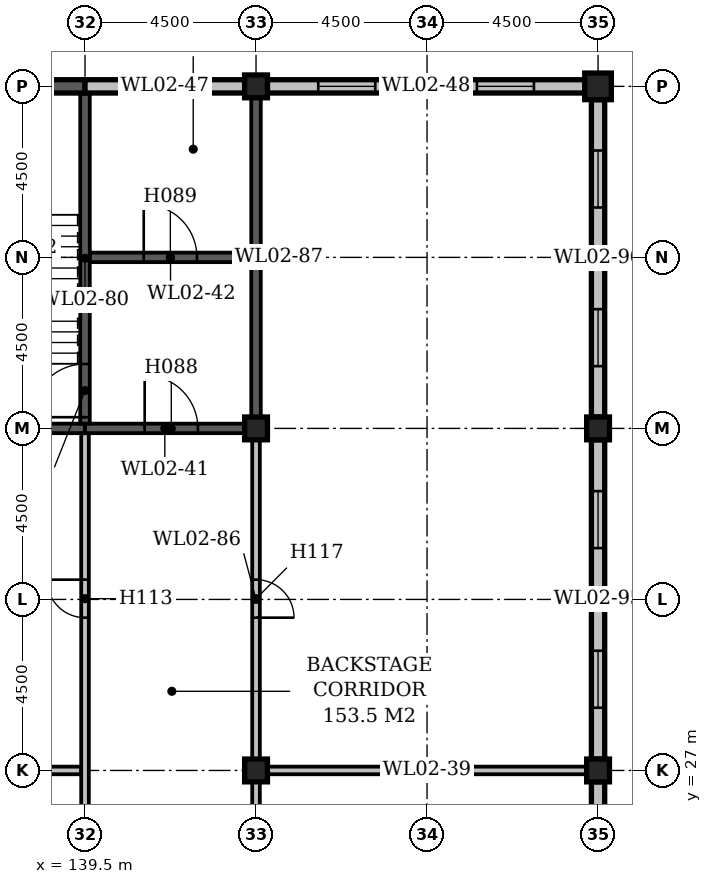
"""IFC4 building model, lengths in metres.
Left out: names, types, materials, properties, quantities, classifications, styles, units other than length and angle.
Written with IfcOpenShell. Run it as: python <this file> out.ifc"""

import sys

from ifc_helpers import new_model, si_unit, direction, frame, frame_2d, origin, origin_2d, place, context, subcontext, project, spatial, rectangle, extrude, element, fill, save


model = new_model("IFC4")
c1 = context("Model", 3, precision=1e-05, world=origin(), true_north=direction((0.0, 1.0)))
c2 = subcontext(c1, "Body", "Model", "MODEL_VIEW")
j1 = project(units=[si_unit("LENGTHUNIT", "METRE"), si_unit("PLANEANGLEUNIT", "RADIAN")], contexts=[c1])
p1 = place(None, origin())
s1 = spatial("IfcSite", under=j1, at=p1, CompositionType="ELEMENT")
p2 = place(p1, origin())
s2 = spatial("IfcBuilding", under=s1, at=p2, CompositionType="ELEMENT")
p3 = place(p2, frame((0.0, 0.0, 14.0)))
s3 = spatial("IfcBuildingStorey", under=s2, at=p3, CompositionType="ELEMENT", Elevation=14.0)
for number, where, z_axis, x_axis in (
    (1, (144.0, 27.0, 0.0), (0.0, 0.0, 1.0), (1.0, 0.0, 0.0)),
    (2, (144.0, 36.0, 0.0), (0.0, 0.0, 1.0), (1.0, 0.0, 0.0)),
    (3, (144.0, 45.0, 0.0), (0.0, 0.0, 1.0), (1.0, 0.0, 0.0)),
    (4, (153.0, 27.0, 0.0), (0.0, 0.0, 1.0), (1.0, 0.0, 0.0)),
    (5, (153.0, 36.0, 0.0), (0.0, 0.0, 1.0), (1.0, 0.0, 0.0)),
):
    element("IfcColumn", number, at=place(p3, frame(where, z_axis=z_axis, x_axis=x_axis)), inside=s3, PredefinedType="COLUMN", context=c2, shape_type="SweptSolid", body=[
        extrude(rectangle(XDim=0.6, YDim=0.6, at=origin_2d()), origin(), (0.0, 0.0, 1.0), 4.7),
    ])
p4 = place(p3, frame((153.0, 45.0, 0.0), z_axis=(0.0, 0.0, 1.0), x_axis=(1.0, 0.0, 0.0)))
e6 = element("IfcColumn", 6, at=p4, inside=s3, PredefinedType="COLUMN", context=c2, shape_type="SweptSolid", body=[
    extrude(rectangle(XDim=0.7, YDim=0.7, at=origin_2d()), origin(), (0.0, 0.0, 1.0), 4.7),
])
p5 = place(p3, frame((135.4, 27.0, 0.0), z_axis=(0.0, 0.0, 1.0), x_axis=(1.0, 0.0, 0.0)))
e7 = element("IfcWall", 7, at=p5, inside=s3, PredefinedType="STANDARD", context=c2, shape_type="SweptSolid", body=[
    extrude(rectangle(XDim=4.0, YDim=0.2, at=frame_2d((2.0, 0.0))), origin(), (0.0, 0.0, 1.0), 4.7),
])
p6 = place(p3, frame((144.3, 27.0, 0.0), z_axis=(0.0, 0.0, 1.0), x_axis=(1.0, 0.0, 0.0)))
e8 = element("IfcWall", 8, at=p6, inside=s3, PredefinedType="STANDARD", context=c2, shape_type="SweptSolid", body=[
    extrude(rectangle(XDim=8.4, YDim=0.2, at=frame_2d((4.2, 0.0))), origin(), (0.0, 0.0, 1.0), 4.7),
])
p7 = place(p3, frame((135.3, 36.0, 0.0), z_axis=(0.0, 0.0, 1.0), x_axis=(1.0, 0.0, 0.0)))
e9 = element("IfcWall", 9, at=p7, inside=s3, PredefinedType="STANDARD", context=c2, shape_type="SweptSolid", body=[
    extrude(rectangle(XDim=4.2, YDim=0.25, at=frame_2d((2.1, 0.0))), origin(), (0.0, 0.0, 1.0), 5.0),
])
p8 = place(p3, frame((139.5, 36.0, 0.0), z_axis=(0.0, 0.0, 1.0), x_axis=(1.0, 0.0, 0.0)))
e10 = element("IfcWall", 10, at=p8, inside=s3, PredefinedType="STANDARD", context=c2, shape_type="SweptSolid", body=[
    extrude(rectangle(XDim=4.2, YDim=0.25, at=frame_2d((2.1, 0.0))), origin(), (0.0, 0.0, 1.0), 4.7),
])
p9 = place(p8, frame((1.57, 0.0, 0.0)))
e11 = element("IfcOpeningElement", 11, at=p9, cuts=e10, PredefinedType="OPENING", context=c2, shape_type="SweptSolid", body=[
    extrude(rectangle(XDim=1.4, YDim=2.1, at=frame_2d((0.7, 1.05))), frame((0.0, 0.137, 0.0), z_axis=(0.0, -1.0, 0.0), x_axis=(1.0, 0.0, 0.0)), (0.0, 0.0, 1.0), 0.274),
])
p10 = place(p3, frame((139.625, 40.5, 0.0), z_axis=(0.0, 0.0, 1.0), x_axis=(1.0, 0.0, 0.0)))
e12 = element("IfcWall", 12, at=p10, inside=s3, PredefinedType="STANDARD", context=c2, shape_type="SweptSolid", body=[
    extrude(rectangle(XDim=4.25, YDim=0.25, at=frame_2d((2.125, 0.0))), origin(), (0.0, 0.0, 1.0), 4.7),
])
p11 = place(p10, frame((1.42, 0.0, 0.0)))
e13 = element("IfcOpeningElement", 13, at=p11, cuts=e12, PredefinedType="OPENING", context=c2, shape_type="SweptSolid", body=[
    extrude(rectangle(XDim=1.4, YDim=2.1, at=frame_2d((0.7, 1.05))), frame((0.0, 0.137, 0.0), z_axis=(0.0, -1.0, 0.0), x_axis=(1.0, 0.0, 0.0)), (0.0, 0.0, 1.0), 0.274),
])
p12 = place(p3, frame((135.4, 45.0, 0.0), z_axis=(0.0, 0.0, 1.0), x_axis=(1.0, 0.0, 0.0)))
e14 = element("IfcWall", 14, at=p12, inside=s3, PredefinedType="STANDARD", context=c2, shape_type="SweptSolid", body=[
    extrude(rectangle(XDim=4.1, YDim=0.35, at=frame_2d((2.05, 0.0))), origin(), (0.0, 0.0, 1.0), 5.0),
])
p13 = place(p3, frame((139.5, 45.0, 0.0), z_axis=(0.0, 0.0, 1.0), x_axis=(1.0, 0.0, 0.0)))
e15 = element("IfcWall", 15, at=p13, inside=s3, PredefinedType="STANDARD", context=c2, shape_type="SweptSolid", body=[
    extrude(rectangle(XDim=4.2, YDim=0.35, at=frame_2d((2.1, 0.0))), origin(), (0.0, 0.0, 1.0), 4.1),
])
p14 = place(p3, frame((144.3, 45.0, 0.0), z_axis=(0.0, 0.0, 1.0), x_axis=(1.0, 0.0, 0.0)))
e16 = element("IfcWall", 16, at=p14, inside=s3, PredefinedType="STANDARD", context=c2, shape_type="SweptSolid", body=[
    extrude(rectangle(XDim=8.35, YDim=0.35, at=frame_2d((4.175, 0.0))), origin(), (0.0, 0.0, 1.0), 4.1),
])
p15 = place(p14, frame((1.337, 0.0, 1.0)))
e17 = element("IfcOpeningElement", 17, at=p15, cuts=e16, PredefinedType="OPENING", context=c2, shape_type="SweptSolid", body=[
    extrude(rectangle(XDim=1.5, YDim=2.4, at=frame_2d((0.75, 1.2))), frame((0.0, 0.187, 0.0), z_axis=(0.0, -1.0, 0.0), x_axis=(1.0, 0.0, 0.0)), (0.0, 0.0, 1.0), 0.374),
])
p16 = place(p14, frame((5.512, 0.0, 1.0)))
e18 = element("IfcOpeningElement", 18, at=p16, cuts=e16, PredefinedType="OPENING", context=c2, shape_type="SweptSolid", body=[
    extrude(rectangle(XDim=1.5, YDim=2.4, at=frame_2d((0.75, 1.2))), frame((0.0, 0.187, 0.0), z_axis=(0.0, -1.0, 0.0), x_axis=(1.0, 0.0, 0.0)), (0.0, 0.0, 1.0), 0.374),
])
p17 = place(p3, frame((139.5, 0.1, 0.0), z_axis=(0.0, 0.0, 1.0), x_axis=(0.0, 1.0, 0.0)))
e19 = element("IfcWall", 19, at=p17, inside=s3, PredefinedType="STANDARD", context=c2, shape_type="SweptSolid", body=[
    extrude(rectangle(XDim=35.775, YDim=0.2, at=frame_2d((17.887, 0.0))), origin(), (0.0, 0.0, 1.0), 4.7),
])
p18 = place(p17, frame((6.17, 0.0, 0.0)))
e20 = element("IfcOpeningElement", 20, at=p18, cuts=e19, PredefinedType="OPENING", context=c2, shape_type="SweptSolid", body=[
    extrude(rectangle(XDim=1.0, YDim=2.1, at=frame_2d((0.5, 1.05))), frame((0.0, 0.112, 0.0), z_axis=(0.0, -1.0, 0.0), x_axis=(1.0, 0.0, 0.0)), (0.0, 0.0, 1.0), 0.224),
])
p19 = place(p17, frame((10.67, 0.0, 0.0)))
e21 = element("IfcOpeningElement", 21, at=p19, cuts=e19, PredefinedType="OPENING", context=c2, shape_type="SweptSolid", body=[
    extrude(rectangle(XDim=1.0, YDim=2.1, at=frame_2d((0.5, 1.05))), frame((0.0, 0.112, 0.0), z_axis=(0.0, -1.0, 0.0), x_axis=(1.0, 0.0, 0.0)), (0.0, 0.0, 1.0), 0.224),
])
p20 = place(p17, frame((15.17, 0.0, 0.0)))
e22 = element("IfcOpeningElement", 22, at=p20, cuts=e19, PredefinedType="OPENING", context=c2, shape_type="SweptSolid", body=[
    extrude(rectangle(XDim=1.0, YDim=2.1, at=frame_2d((0.5, 1.05))), frame((0.0, 0.112, 0.0), z_axis=(0.0, -1.0, 0.0), x_axis=(1.0, 0.0, 0.0)), (0.0, 0.0, 1.0), 0.224),
])
p21 = place(p17, frame((19.67, 0.0, 0.0)))
e23 = element("IfcOpeningElement", 23, at=p21, cuts=e19, PredefinedType="OPENING", context=c2, shape_type="SweptSolid", body=[
    extrude(rectangle(XDim=1.0, YDim=2.1, at=frame_2d((0.5, 1.05))), frame((0.0, 0.112, 0.0), z_axis=(0.0, -1.0, 0.0), x_axis=(1.0, 0.0, 0.0)), (0.0, 0.0, 1.0), 0.224),
])
p22 = place(p17, frame((24.17, 0.0, 0.0)))
e24 = element("IfcOpeningElement", 24, at=p22, cuts=e19, PredefinedType="OPENING", context=c2, shape_type="SweptSolid", body=[
    extrude(rectangle(XDim=1.0, YDim=2.1, at=frame_2d((0.5, 1.05))), frame((0.0, 0.112, 0.0), z_axis=(0.0, -1.0, 0.0), x_axis=(1.0, 0.0, 0.0)), (0.0, 0.0, 1.0), 0.224),
])
p23 = place(p17, frame((30.92, 0.0, 0.0)))
e25 = element("IfcOpeningElement", 25, at=p23, cuts=e19, PredefinedType="OPENING", context=c2, shape_type="SweptSolid", body=[
    extrude(rectangle(XDim=1.0, YDim=2.1, at=frame_2d((0.5, 1.05))), frame((0.0, 0.112, 0.0), z_axis=(0.0, -1.0, 0.0), x_axis=(1.0, 0.0, 0.0)), (0.0, 0.0, 1.0), 0.224),
])
p24 = place(p3, frame((139.5, 36.125, 0.0), z_axis=(0.0, 0.0, 1.0), x_axis=(0.0, 1.0, 0.0)))
e26 = element("IfcWall", 26, at=p24, inside=s3, PredefinedType="STANDARD", context=c2, shape_type="SweptSolid", body=[
    extrude(rectangle(XDim=8.7, YDim=0.25, at=frame_2d((4.35, 0.0))), origin(), (0.0, 0.0, 1.0), 5.0),
])
p25 = place(p24, frame((0.17, 0.0, 0.0)))
e27 = element("IfcOpeningElement", 27, at=p25, cuts=e26, PredefinedType="OPENING", context=c2, shape_type="SweptSolid", body=[
    extrude(rectangle(XDim=1.4, YDim=2.1, at=frame_2d((0.7, 1.05))), frame((0.0, 0.137, 0.0), z_axis=(0.0, -1.0, 0.0), x_axis=(1.0, 0.0, 0.0)), (0.0, 0.0, 1.0), 0.274),
])
p26 = place(p3, frame((144.0, 18.3, 0.0), z_axis=(0.0, 0.0, 1.0), x_axis=(0.0, 1.0, 0.0)))
e28 = element("IfcWall", 28, at=p26, inside=s3, PredefinedType="STANDARD", context=c2, shape_type="SweptSolid", body=[
    extrude(rectangle(XDim=8.4, YDim=0.2, at=frame_2d((4.2, 0.0))), origin(), (0.0, 0.0, 1.0), 4.7),
])
p27 = place(p26, frame((2.97, 0.0, 0.0)))
e29 = element("IfcOpeningElement", 29, at=p27, cuts=e28, PredefinedType="OPENING", context=c2, shape_type="SweptSolid", body=[
    extrude(rectangle(XDim=1.0, YDim=2.1, at=frame_2d((0.5, 1.05))), frame((0.0, 0.112, 0.0), z_axis=(0.0, -1.0, 0.0), x_axis=(1.0, 0.0, 0.0)), (0.0, 0.0, 1.0), 0.224),
])
p28 = place(p3, frame((144.0, 27.3, 0.0), z_axis=(0.0, 0.0, 1.0), x_axis=(0.0, 1.0, 0.0)))
e30 = element("IfcWall", 30, at=p28, inside=s3, PredefinedType="STANDARD", context=c2, shape_type="SweptSolid", body=[
    extrude(rectangle(XDim=8.4, YDim=0.2, at=frame_2d((4.2, 0.0))), origin(), (0.0, 0.0, 1.0), 4.7),
])
p29 = place(p28, frame((3.72, 0.0, 0.0)))
e31 = element("IfcOpeningElement", 31, at=p29, cuts=e30, PredefinedType="OPENING", context=c2, shape_type="SweptSolid", body=[
    extrude(rectangle(XDim=1.0, YDim=2.1, at=frame_2d((0.5, 1.05))), frame((0.0, 0.112, 0.0), z_axis=(0.0, -1.0, 0.0), x_axis=(1.0, 0.0, 0.0)), (0.0, 0.0, 1.0), 0.224),
])
p30 = place(p3, frame((144.0, 36.3, 0.0), z_axis=(0.0, 0.0, 1.0), x_axis=(0.0, 1.0, 0.0)))
e32 = element("IfcWall", 32, at=p30, inside=s3, PredefinedType="STANDARD", context=c2, shape_type="SweptSolid", body=[
    extrude(rectangle(XDim=8.4, YDim=0.25, at=frame_2d((4.2, 0.0))), origin(), (0.0, 0.0, 1.0), 4.7),
])
p31 = place(p3, frame((153.0, 18.3, 0.0), z_axis=(0.0, 0.0, 1.0), x_axis=(0.0, 1.0, 0.0)))
e33 = element("IfcWall", 33, at=p31, inside=s3, PredefinedType="STANDARD", context=c2, shape_type="SweptSolid", body=[
    extrude(rectangle(XDim=8.4, YDim=0.35, at=frame_2d((4.2, 0.0))), origin(), (0.0, 0.0, 1.0), 4.1),
])
p32 = place(p31, frame((1.35, 0.0, 1.0)))
e34 = element("IfcOpeningElement", 34, at=p32, cuts=e33, PredefinedType="OPENING", context=c2, shape_type="SweptSolid", body=[
    extrude(rectangle(XDim=1.5, YDim=2.4, at=frame_2d((0.75, 1.2))), frame((0.0, 0.187, 0.0), z_axis=(0.0, -1.0, 0.0), x_axis=(1.0, 0.0, 0.0)), (0.0, 0.0, 1.0), 0.374),
])
p33 = place(p31, frame((5.55, 0.0, 1.0)))
e35 = element("IfcOpeningElement", 35, at=p33, cuts=e33, PredefinedType="OPENING", context=c2, shape_type="SweptSolid", body=[
    extrude(rectangle(XDim=1.5, YDim=2.4, at=frame_2d((0.75, 1.2))), frame((0.0, 0.187, 0.0), z_axis=(0.0, -1.0, 0.0), x_axis=(1.0, 0.0, 0.0)), (0.0, 0.0, 1.0), 0.374),
])
p34 = place(p3, frame((153.0, 27.3, 0.0), z_axis=(0.0, 0.0, 1.0), x_axis=(0.0, 1.0, 0.0)))
e36 = element("IfcWall", 36, at=p34, inside=s3, PredefinedType="STANDARD", context=c2, shape_type="SweptSolid", body=[
    extrude(rectangle(XDim=8.4, YDim=0.35, at=frame_2d((4.2, 0.0))), origin(), (0.0, 0.0, 1.0), 4.1),
])
p35 = place(p34, frame((1.35, 0.0, 1.0)))
e37 = element("IfcOpeningElement", 37, at=p35, cuts=e36, PredefinedType="OPENING", context=c2, shape_type="SweptSolid", body=[
    extrude(rectangle(XDim=1.5, YDim=2.4, at=frame_2d((0.75, 1.2))), frame((0.0, 0.187, 0.0), z_axis=(0.0, -1.0, 0.0), x_axis=(1.0, 0.0, 0.0)), (0.0, 0.0, 1.0), 0.374),
])
p36 = place(p34, frame((5.55, 0.0, 1.0)))
e38 = element("IfcOpeningElement", 38, at=p36, cuts=e36, PredefinedType="OPENING", context=c2, shape_type="SweptSolid", body=[
    extrude(rectangle(XDim=1.5, YDim=2.4, at=frame_2d((0.75, 1.2))), frame((0.0, 0.187, 0.0), z_axis=(0.0, -1.0, 0.0), x_axis=(1.0, 0.0, 0.0)), (0.0, 0.0, 1.0), 0.374),
])
p37 = place(p3, frame((153.0, 36.3, 0.0), z_axis=(0.0, 0.0, 1.0), x_axis=(0.0, 1.0, 0.0)))
e39 = element("IfcWall", 39, at=p37, inside=s3, PredefinedType="STANDARD", context=c2, shape_type="SweptSolid", body=[
    extrude(rectangle(XDim=8.35, YDim=0.35, at=frame_2d((4.175, 0.0))), origin(), (0.0, 0.0, 1.0), 4.1),
])
p38 = place(p37, frame((1.337, 0.0, 1.0)))
e40 = element("IfcOpeningElement", 40, at=p38, cuts=e39, PredefinedType="OPENING", context=c2, shape_type="SweptSolid", body=[
    extrude(rectangle(XDim=1.5, YDim=2.4, at=frame_2d((0.75, 1.2))), frame((0.0, 0.187, 0.0), z_axis=(0.0, -1.0, 0.0), x_axis=(1.0, 0.0, 0.0)), (0.0, 0.0, 1.0), 0.374),
])
p39 = place(p37, frame((5.512, 0.0, 1.0)))
e41 = element("IfcOpeningElement", 41, at=p39, cuts=e39, PredefinedType="OPENING", context=c2, shape_type="SweptSolid", body=[
    extrude(rectangle(XDim=1.5, YDim=2.4, at=frame_2d((0.75, 1.2))), frame((0.0, 0.187, 0.0), z_axis=(0.0, -1.0, 0.0), x_axis=(1.0, 0.0, 0.0)), (0.0, 0.0, 1.0), 0.374),
])
p40 = place(p25, origin())
e42 = element("IfcDoor", 42, at=p40, inside=s3, OperationType="DOUBLE_DOOR_SINGLE_SWING", PredefinedType="DOOR", context=c2, shape_type="SweptSolid", body=[
    extrude(rectangle(XDim=1.4, YDim=2.1, at=frame_2d((0.7, 1.05))), frame((0.0, 0.025, 0.0), z_axis=(0.0, -1.0, 0.0), x_axis=(1.0, 0.0, 0.0)), (0.0, 0.0, 1.0), 0.05),
])
fill(e27, e42)
p41 = place(p9, origin())
e43 = element("IfcDoor", 43, at=p41, inside=s3, OperationType="DOUBLE_DOOR_SINGLE_SWING", PredefinedType="DOOR", context=c2, shape_type="SweptSolid", body=[
    extrude(rectangle(XDim=1.4, YDim=2.1, at=frame_2d((0.7, 1.05))), frame((0.0, 0.025, 0.0), z_axis=(0.0, -1.0, 0.0), x_axis=(1.0, 0.0, 0.0)), (0.0, 0.0, 1.0), 0.05),
])
fill(e11, e43)
p42 = place(p11, origin())
e44 = element("IfcDoor", 44, at=p42, inside=s3, OperationType="DOUBLE_DOOR_SINGLE_SWING", PredefinedType="DOOR", context=c2, shape_type="SweptSolid", body=[
    extrude(rectangle(XDim=1.4, YDim=2.1, at=frame_2d((0.7, 1.05))), frame((0.0, 0.025, 0.0), z_axis=(0.0, -1.0, 0.0), x_axis=(1.0, 0.0, 0.0)), (0.0, 0.0, 1.0), 0.05),
])
fill(e13, e44)
p43 = place(p23, frame((1.0, 0.0, 0.0), z_axis=(0.0, 0.0, 1.0), x_axis=(-1.0, 0.0, 0.0)))
e45 = element("IfcDoor", 45, at=p43, inside=s3, OperationType="SINGLE_SWING_LEFT", PredefinedType="DOOR", context=c2, shape_type="SweptSolid", body=[
    extrude(rectangle(XDim=1.0, YDim=2.1, at=frame_2d((0.5, 1.05))), frame((0.0, 0.025, 0.0), z_axis=(0.0, -1.0, 0.0), x_axis=(1.0, 0.0, 0.0)), (0.0, 0.0, 1.0), 0.05),
])
fill(e25, e45)
p44 = place(p29, frame((1.0, 0.0, 0.0), z_axis=(0.0, 0.0, 1.0), x_axis=(-1.0, 0.0, 0.0)))
e46 = element("IfcDoor", 46, at=p44, inside=s3, OperationType="SINGLE_SWING_RIGHT", PredefinedType="DOOR", context=c2, shape_type="SweptSolid", body=[
    extrude(rectangle(XDim=1.0, YDim=2.1, at=frame_2d((0.5, 1.05))), frame((0.0, 0.025, 0.0), z_axis=(0.0, -1.0, 0.0), x_axis=(1.0, 0.0, 0.0)), (0.0, 0.0, 1.0), 0.05),
])
fill(e31, e46)
p45 = place(p15, origin())
e47 = element("IfcWindow", 47, at=p45, inside=s3, PartitioningType="SINGLE_PANEL", PredefinedType="WINDOW", context=c2, shape_type="SweptSolid", body=[
    extrude(rectangle(XDim=1.5, YDim=2.4, at=frame_2d((0.75, 1.2))), frame((0.0, 0.03, 0.0), z_axis=(0.0, -1.0, 0.0), x_axis=(1.0, 0.0, 0.0)), (0.0, 0.0, 1.0), 0.06),
])
fill(e17, e47)
p46 = place(p16, origin())
e48 = element("IfcWindow", 48, at=p46, inside=s3, PartitioningType="SINGLE_PANEL", PredefinedType="WINDOW", context=c2, shape_type="SweptSolid", body=[
    extrude(rectangle(XDim=1.5, YDim=2.4, at=frame_2d((0.75, 1.2))), frame((0.0, 0.03, 0.0), z_axis=(0.0, -1.0, 0.0), x_axis=(1.0, 0.0, 0.0)), (0.0, 0.0, 1.0), 0.06),
])
fill(e18, e48)
p47 = place(p35, origin())
e49 = element("IfcWindow", 49, at=p47, inside=s3, PartitioningType="SINGLE_PANEL", PredefinedType="WINDOW", context=c2, shape_type="SweptSolid", body=[
    extrude(rectangle(XDim=1.5, YDim=2.4, at=frame_2d((0.75, 1.2))), frame((0.0, 0.03, 0.0), z_axis=(0.0, -1.0, 0.0), x_axis=(1.0, 0.0, 0.0)), (0.0, 0.0, 1.0), 0.06),
])
fill(e37, e49)
p48 = place(p36, origin())
e50 = element("IfcWindow", 50, at=p48, inside=s3, PartitioningType="SINGLE_PANEL", PredefinedType="WINDOW", context=c2, shape_type="SweptSolid", body=[
    extrude(rectangle(XDim=1.5, YDim=2.4, at=frame_2d((0.75, 1.2))), frame((0.0, 0.03, 0.0), z_axis=(0.0, -1.0, 0.0), x_axis=(1.0, 0.0, 0.0)), (0.0, 0.0, 1.0), 0.06),
])
fill(e38, e50)
p49 = place(p38, origin())
e51 = element("IfcWindow", 51, at=p49, inside=s3, PartitioningType="SINGLE_PANEL", PredefinedType="WINDOW", context=c2, shape_type="SweptSolid", body=[
    extrude(rectangle(XDim=1.5, YDim=2.4, at=frame_2d((0.75, 1.2))), frame((0.0, 0.03, 0.0), z_axis=(0.0, -1.0, 0.0), x_axis=(1.0, 0.0, 0.0)), (0.0, 0.0, 1.0), 0.06),
])
fill(e40, e51)
p50 = place(p39, origin())
e52 = element("IfcWindow", 52, at=p50, inside=s3, PartitioningType="SINGLE_PANEL", PredefinedType="WINDOW", context=c2, shape_type="SweptSolid", body=[
    extrude(rectangle(XDim=1.5, YDim=2.4, at=frame_2d((0.75, 1.2))), frame((0.0, 0.03, 0.0), z_axis=(0.0, -1.0, 0.0), x_axis=(1.0, 0.0, 0.0)), (0.0, 0.0, 1.0), 0.06),
])
fill(e41, e52)
save(model, sys.argv[1])
